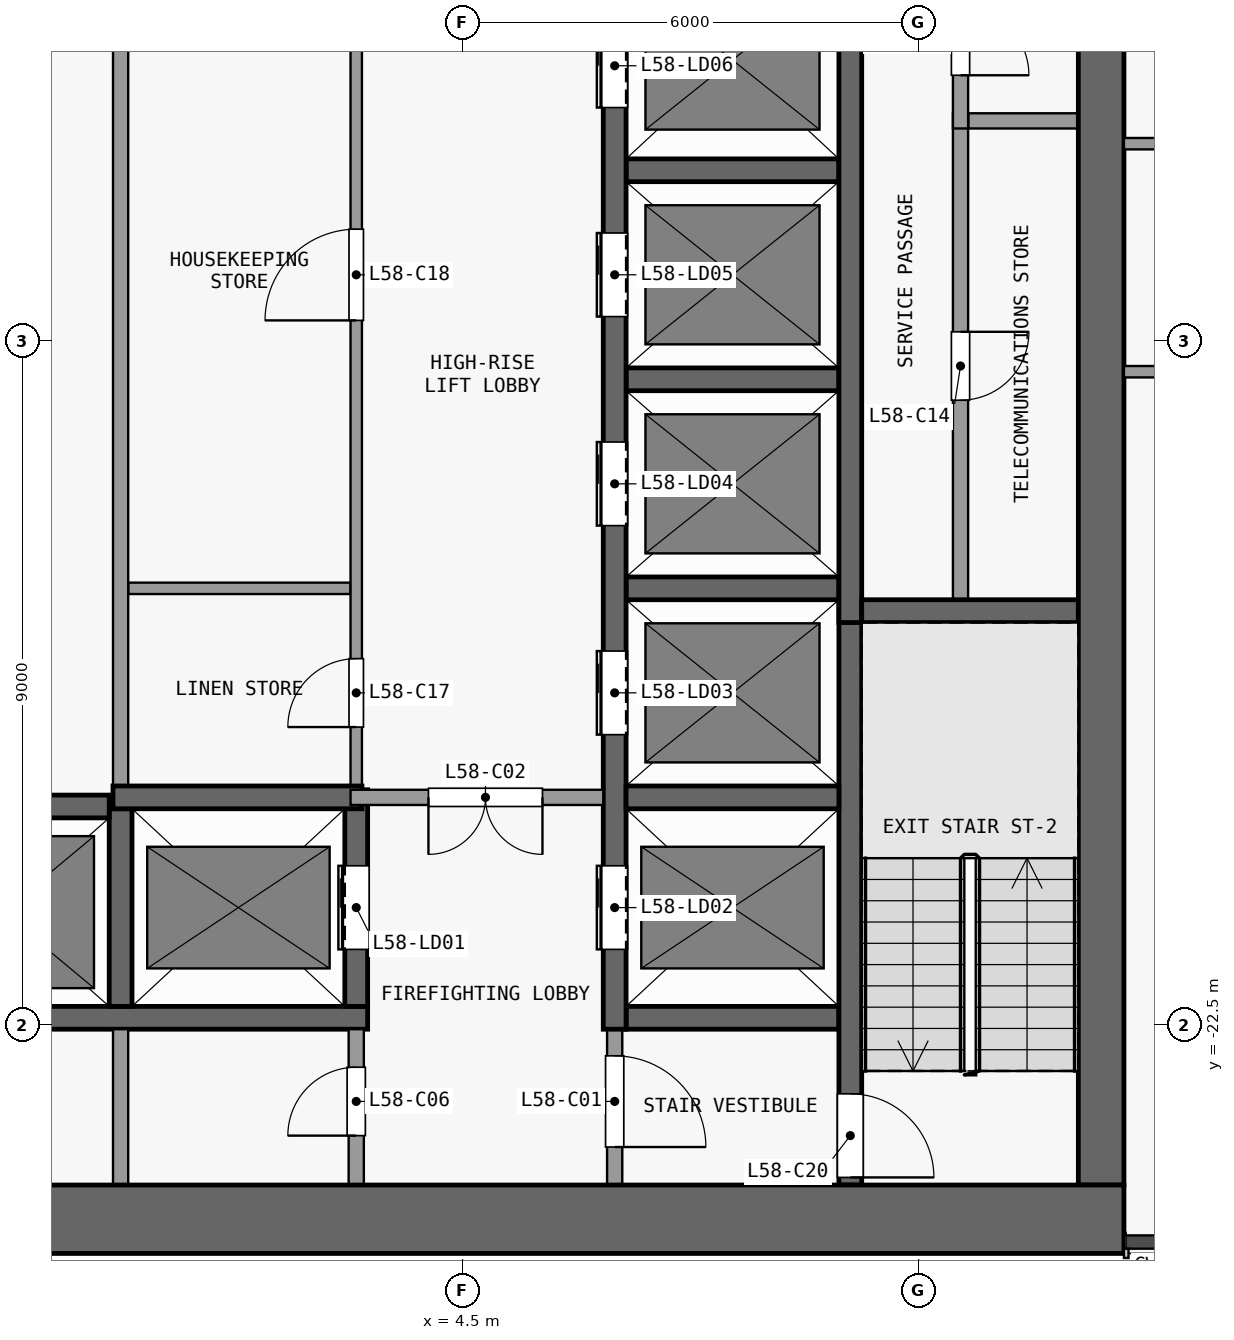
"""IFC4 building model, lengths in metres.
Left out: names, types, materials, properties, quantities, classifications, styles, units other than length and angle.
Written with IfcOpenShell. Run it as: python <this file> out.ifc"""

import sys

from ifc_helpers import new_model, si_unit, direction, frame, frame_2d, origin, place, context, subcontext, project, spatial, rectangle, extrude, element, fill, save


model = new_model("IFC4")
c1 = context("Model", 3, precision=1e-05, world=origin(), true_north=direction((0.0, 1.0)))
c2 = subcontext(c1, "Body", "Model", "MODEL_VIEW")
j1 = project(units=[si_unit("LENGTHUNIT", "METRE"), si_unit("PLANEANGLEUNIT", "RADIAN")], contexts=[c1])
p1 = place(None, origin())
s1 = spatial("IfcSite", under=j1, at=p1, CompositionType="ELEMENT")
p2 = place(p1, origin())
s2 = spatial("IfcBuilding", under=s1, at=p2, CompositionType="ELEMENT")
p3 = place(p2, frame((0.0, 0.0, 230.3)))
s3 = spatial("IfcBuildingStorey", under=s2, at=p3, CompositionType="ELEMENT", Elevation=230.3)
p4 = place(p3, frame((-13.2, -25.05, 0.0), z_axis=(0.0, 0.0, 1.0), x_axis=(1.0, 0.0, 0.0)))
e1 = element("IfcWall", 1, at=p4, inside=s3, PredefinedType="SHEAR", context=c2, shape_type="SweptSolid", body=[
    extrude(rectangle(XDim=26.4, YDim=0.9, at=frame_2d((13.2, 0.0))), origin(), (0.0, 0.0, 1.0), 3.3),
])
p5 = place(p3, frame((12.9, -24.6, 0.0), z_axis=(0.0, 0.0, 1.0), x_axis=(0.0, 1.0, 0.0)))
e2 = element("IfcWall", 2, at=p5, inside=s3, PredefinedType="SHEAR", context=c2, shape_type="SweptSolid", body=[
    extrude(rectangle(XDim=16.1, YDim=0.6, at=frame_2d((8.05, 0.0))), origin(), (0.0, 0.0, 1.0), 3.3),
])
p6 = place(p3, frame((-3.25, -22.4, 0.0), z_axis=(0.0, 0.0, 1.0), x_axis=(1.0, 0.0, 0.0)))
e3 = element("IfcWall", 3, at=p6, inside=s3, PredefinedType="SHEAR", context=c2, shape_type="SweptSolid", body=[
    extrude(rectangle(XDim=6.5, YDim=0.3, at=frame_2d((3.25, 0.0))), origin(), (0.0, 0.0, 1.0), 3.3),
])
p7 = place(p3, frame((6.65, -22.4, 0.0), z_axis=(0.0, 0.0, 1.0), x_axis=(1.0, 0.0, 0.0)))
e4 = element("IfcWall", 4, at=p7, inside=s3, PredefinedType="SHEAR", context=c2, shape_type="SweptSolid", body=[
    extrude(rectangle(XDim=2.8, YDim=0.3, at=frame_2d((1.4, 0.0))), origin(), (0.0, 0.0, 1.0), 3.3),
])
p8 = place(p3, frame((-3.2, -19.62, 0.0), z_axis=(0.0, 0.0, 1.0), x_axis=(1.0, 0.0, 0.0)))
e5 = element("IfcWall", 5, at=p8, inside=s3, PredefinedType="SHEAR", context=c2, shape_type="SweptSolid", body=[
    extrude(rectangle(XDim=3.05, YDim=0.3, at=frame_2d((1.525, 0.0))), origin(), (0.0, 0.0, 1.0), 3.3),
])
p9 = place(p3, frame((-0.1, -19.5, 0.0), z_axis=(0.0, 0.0, 1.0), x_axis=(1.0, 0.0, 0.0)))
e6 = element("IfcWall", 6, at=p9, inside=s3, PredefinedType="SHEAR", context=c2, shape_type="SweptSolid", body=[
    extrude(rectangle(XDim=3.275, YDim=0.3, at=frame_2d((1.638, 0.0))), origin(), (0.0, 0.0, 1.0), 3.3),
])
p10 = place(p3, frame((6.35, -19.5, 0.0), z_axis=(0.0, 0.0, 1.0), x_axis=(-1.0, 0.0, 0.0)))
e7 = element("IfcWall", 7, at=p10, inside=s3, PredefinedType="PARTITIONING", context=c2, shape_type="SweptSolid", body=[
    extrude(rectangle(XDim=3.325, YDim=0.2, at=frame_2d((1.663, 0.0))), origin(), (0.0, 0.0, 1.0), 3.3),
])
p11 = place(p10, frame((0.8, 0.0, 0.0)))
e8 = element("IfcOpeningElement", 8, at=p11, cuts=e7, PredefinedType="OPENING", context=c2, shape_type="SweptSolid", body=[
    extrude(rectangle(XDim=1.5, YDim=2.1, at=frame_2d((0.75, 1.05))), frame((0.0, 0.11, 0.0), z_axis=(0.0, -1.0, 0.0), x_axis=(1.0, 0.0, 0.0)), (0.0, 0.0, 1.0), 0.22),
])
p12 = place(p3, frame((6.65, -19.5, 0.0), z_axis=(0.0, 0.0, 1.0), x_axis=(1.0, 0.0, 0.0)))
e9 = element("IfcWall", 9, at=p12, inside=s3, PredefinedType="SHEAR", context=c2, shape_type="SweptSolid", body=[
    extrude(rectangle(XDim=2.8, YDim=0.3, at=frame_2d((1.4, 0.0))), origin(), (0.0, 0.0, 1.0), 3.3),
])
p13 = place(p3, frame((9.75, -17.05, 0.0), z_axis=(0.0, 0.0, 1.0), x_axis=(1.0, 0.0, 0.0)))
e10 = element("IfcWall", 10, at=p13, inside=s3, PredefinedType="SHEAR", context=c2, shape_type="SweptSolid", body=[
    extrude(rectangle(XDim=2.85, YDim=0.3, at=frame_2d((1.425, 0.0))), origin(), (0.0, 0.0, 1.0), 3.3),
])
p14 = place(p3, frame((0.1, -16.75, 0.0), z_axis=(0.0, 0.0, 1.0), x_axis=(1.0, 0.0, 0.0)))
e11 = element("IfcWall", 11, at=p14, inside=s3, PredefinedType="PARTITIONING", context=c2, shape_type="SweptSolid", body=[
    extrude(rectangle(XDim=2.925, YDim=0.15, at=frame_2d((1.462, 0.0))), origin(), (0.0, 0.0, 1.0), 3.3),
])
for number, where, z_axis, x_axis in (
    (12, (6.65, -16.75, 0.0), (0.0, 0.0, 1.0), (1.0, 0.0, 0.0)),
    (13, (6.65, -14.0, 0.0), (0.0, 0.0, 1.0), (1.0, 0.0, 0.0)),
    (14, (6.65, -11.25, 0.0), (0.0, 0.0, 1.0), (1.0, 0.0, 0.0)),
):
    element("IfcWall", number, at=place(p3, frame(where, z_axis=z_axis, x_axis=x_axis)), inside=s3, PredefinedType="SHEAR", context=c2, shape_type="SweptSolid", body=[
        extrude(rectangle(XDim=2.8, YDim=0.3, at=frame_2d((1.4, 0.0))), origin(), (0.0, 0.0, 1.0), 3.3),
    ])
p15 = place(p3, frame((11.15, -10.6, 0.0), z_axis=(0.0, 0.0, 1.0), x_axis=(1.0, 0.0, 0.0)))
e15 = element("IfcWall", 15, at=p15, inside=s3, PredefinedType="PARTITIONING", context=c2, shape_type="SweptSolid", body=[
    extrude(rectangle(XDim=1.45, YDim=0.2, at=frame_2d((0.725, 0.0))), origin(), (0.0, 0.0, 1.0), 3.3),
])
p16 = place(p3, frame((0.0, -24.6, 0.0), z_axis=(0.0, 0.0, 1.0), x_axis=(0.0, 1.0, 0.0)))
e16 = element("IfcWall", 16, at=p16, inside=s3, PredefinedType="PARTITIONING", context=c2, shape_type="SweptSolid", body=[
    extrude(rectangle(XDim=2.05, YDim=0.2, at=frame_2d((1.025, 0.0))), origin(), (0.0, 0.0, 1.0), 3.3),
])
p17 = place(p3, frame((0.0, -22.25, 0.0), z_axis=(0.0, 0.0, 1.0), x_axis=(0.0, 1.0, 0.0)))
e17 = element("IfcWall", 17, at=p17, inside=s3, PredefinedType="SHEAR", context=c2, shape_type="SweptSolid", body=[
    extrude(rectangle(XDim=2.6, YDim=0.3, at=frame_2d((1.3, 0.0))), origin(), (0.0, 0.0, 1.0), 3.3),
])
p18 = place(p3, frame((0.0, -19.35, 0.0), z_axis=(0.0, 0.0, 1.0), x_axis=(0.0, 1.0, 0.0)))
e18 = element("IfcWall", 18, at=p18, inside=s3, PredefinedType="PARTITIONING", context=c2, shape_type="SweptSolid", body=[
    extrude(rectangle(XDim=10.85, YDim=0.2, at=frame_2d((5.425, 0.0))), origin(), (0.0, 0.0, 1.0), 3.3),
])
p19 = place(p3, frame((3.1, -24.6, 0.0), z_axis=(0.0, 0.0, 1.0), x_axis=(0.0, 1.0, 0.0)))
e19 = element("IfcWall", 19, at=p19, inside=s3, PredefinedType="PARTITIONING", context=c2, shape_type="SweptSolid", body=[
    extrude(rectangle(XDim=2.05, YDim=0.2, at=frame_2d((1.025, 0.0))), origin(), (0.0, 0.0, 1.0), 3.3),
])
p20 = place(p19, frame((0.65, 0.0, 0.0)))
e20 = element("IfcOpeningElement", 20, at=p20, cuts=e19, PredefinedType="OPENING", context=c2, shape_type="SweptSolid", body=[
    extrude(rectangle(XDim=0.9, YDim=2.1, at=frame_2d((0.45, 1.05))), frame((0.0, 0.11, 0.0), z_axis=(0.0, -1.0, 0.0), x_axis=(1.0, 0.0, 0.0)), (0.0, 0.0, 1.0), 0.22),
])
p21 = place(p3, frame((3.1, -22.25, 0.0), z_axis=(0.0, 0.0, 1.0), x_axis=(0.0, 1.0, 0.0)))
e21 = element("IfcWall", 21, at=p21, inside=s3, PredefinedType="SHEAR", context=c2, shape_type="SweptSolid", body=[
    extrude(rectangle(XDim=2.85, YDim=0.3, at=frame_2d((1.425, 0.0))), origin(), (0.0, 0.0, 1.0), 3.3),
])
p22 = place(p21, frame((0.75, 0.0, 0.0)))
e22 = element("IfcOpeningElement", 22, at=p22, cuts=e21, PredefinedType="OPENING", context=c2, shape_type="SweptSolid", body=[
    extrude(rectangle(XDim=1.1, YDim=2.1, at=frame_2d((0.55, 1.05))), frame((0.0, 0.16, 0.0), z_axis=(0.0, -1.0, 0.0), x_axis=(1.0, 0.0, 0.0)), (0.0, 0.0, 1.0), 0.32),
])
p23 = place(p3, frame((3.1, -19.4, 0.0), z_axis=(0.0, 0.0, 1.0), x_axis=(0.0, 1.0, 0.0)))
e23 = element("IfcWall", 23, at=p23, inside=s3, PredefinedType="PARTITIONING", context=c2, shape_type="SweptSolid", body=[
    extrude(rectangle(XDim=10.9, YDim=0.15, at=frame_2d((5.45, 0.0))), origin(), (0.0, 0.0, 1.0), 3.3),
])
p24 = place(p23, frame((0.825, 0.0, 0.0)))
e24 = element("IfcOpeningElement", 24, at=p24, cuts=e23, PredefinedType="OPENING", context=c2, shape_type="SweptSolid", body=[
    extrude(rectangle(XDim=0.9, YDim=2.1, at=frame_2d((0.45, 1.05))), frame((0.0, 0.085, 0.0), z_axis=(0.0, -1.0, 0.0), x_axis=(1.0, 0.0, 0.0)), (0.0, 0.0, 1.0), 0.17),
])
p25 = place(p23, frame((6.175, 0.0, 0.0)))
e25 = element("IfcOpeningElement", 25, at=p25, cuts=e23, PredefinedType="OPENING", context=c2, shape_type="SweptSolid", body=[
    extrude(rectangle(XDim=1.2, YDim=2.1, at=frame_2d((0.6, 1.05))), frame((0.0, 0.085, 0.0), z_axis=(0.0, -1.0, 0.0), x_axis=(1.0, 0.0, 0.0)), (0.0, 0.0, 1.0), 0.17),
])
p26 = place(p3, frame((6.5, -22.55, 0.0), z_axis=(0.0, 0.0, 1.0), x_axis=(0.0, -1.0, 0.0)))
e26 = element("IfcWall", 26, at=p26, inside=s3, PredefinedType="PARTITIONING", context=c2, shape_type="SweptSolid", body=[
    extrude(rectangle(XDim=2.05, YDim=0.2, at=frame_2d((1.025, 0.0))), origin(), (0.0, 0.0, 1.0), 3.3),
])
p27 = place(p26, frame((0.35, 0.0, 0.0)))
e27 = element("IfcOpeningElement", 27, at=p27, cuts=e26, PredefinedType="OPENING", context=c2, shape_type="SweptSolid", body=[
    extrude(rectangle(XDim=1.2, YDim=2.1, at=frame_2d((0.6, 1.05))), frame((0.0, 0.11, 0.0), z_axis=(0.0, -1.0, 0.0), x_axis=(1.0, 0.0, 0.0)), (0.0, 0.0, 1.0), 0.22),
])
p28 = place(p3, frame((6.5, -22.55, 0.0), z_axis=(0.0, 0.0, 1.0), x_axis=(0.0, 1.0, 0.0)))
e28 = element("IfcWall", 28, at=p28, inside=s3, PredefinedType="SHEAR", context=c2, shape_type="SweptSolid", body=[
    extrude(rectangle(XDim=14.05, YDim=0.3, at=frame_2d((7.025, 0.0))), origin(), (0.0, 0.0, 1.0), 3.3),
])
p29 = place(p28, frame((1.05, 0.0, 0.0)))
e29 = element("IfcOpeningElement", 29, at=p29, cuts=e28, PredefinedType="OPENING", context=c2, shape_type="SweptSolid", body=[
    extrude(rectangle(XDim=1.1, YDim=2.1, at=frame_2d((0.55, 1.05))), frame((0.0, 0.16, 0.0), z_axis=(0.0, -1.0, 0.0), x_axis=(1.0, 0.0, 0.0)), (0.0, 0.0, 1.0), 0.32),
])
p30 = place(p28, frame((3.875, 0.0, 0.0)))
e30 = element("IfcOpeningElement", 30, at=p30, cuts=e28, PredefinedType="OPENING", context=c2, shape_type="SweptSolid", body=[
    extrude(rectangle(XDim=1.1, YDim=2.1, at=frame_2d((0.55, 1.05))), frame((0.0, 0.16, 0.0), z_axis=(0.0, -1.0, 0.0), x_axis=(1.0, 0.0, 0.0)), (0.0, 0.0, 1.0), 0.32),
])
p31 = place(p28, frame((6.625, 0.0, 0.0)))
e31 = element("IfcOpeningElement", 31, at=p31, cuts=e28, PredefinedType="OPENING", context=c2, shape_type="SweptSolid", body=[
    extrude(rectangle(XDim=1.1, YDim=2.1, at=frame_2d((0.55, 1.05))), frame((0.0, 0.16, 0.0), z_axis=(0.0, -1.0, 0.0), x_axis=(1.0, 0.0, 0.0)), (0.0, 0.0, 1.0), 0.32),
])
p32 = place(p28, frame((9.375, 0.0, 0.0)))
e32 = element("IfcOpeningElement", 32, at=p32, cuts=e28, PredefinedType="OPENING", context=c2, shape_type="SweptSolid", body=[
    extrude(rectangle(XDim=1.1, YDim=2.1, at=frame_2d((0.55, 1.05))), frame((0.0, 0.16, 0.0), z_axis=(0.0, -1.0, 0.0), x_axis=(1.0, 0.0, 0.0)), (0.0, 0.0, 1.0), 0.32),
])
p33 = place(p28, frame((12.125, 0.0, 0.0)))
e33 = element("IfcOpeningElement", 33, at=p33, cuts=e28, PredefinedType="OPENING", context=c2, shape_type="SweptSolid", body=[
    extrude(rectangle(XDim=1.1, YDim=2.1, at=frame_2d((0.55, 1.05))), frame((0.0, 0.16, 0.0), z_axis=(0.0, -1.0, 0.0), x_axis=(1.0, 0.0, 0.0)), (0.0, 0.0, 1.0), 0.32),
])
p34 = place(p3, frame((9.6, -16.9, 0.0), z_axis=(0.0, 0.0, 1.0), x_axis=(0.0, -1.0, 0.0)))
e34 = element("IfcWall", 34, at=p34, inside=s3, PredefinedType="SHEAR", context=c2, shape_type="SweptSolid", body=[
    extrude(rectangle(XDim=7.7, YDim=0.3, at=frame_2d((3.85, 0.0))), origin(), (0.0, 0.0, 1.0), 3.3),
])
p35 = place(p34, frame((6.5, 0.0, 0.0)))
e35 = element("IfcOpeningElement", 35, at=p35, cuts=e34, PredefinedType="OPENING", context=c2, shape_type="SweptSolid", body=[
    extrude(rectangle(XDim=1.1, YDim=2.1, at=frame_2d((0.55, 1.05))), frame((0.0, 0.16, 0.0), z_axis=(0.0, -1.0, 0.0), x_axis=(1.0, 0.0, 0.0)), (0.0, 0.0, 1.0), 0.32),
])
p36 = place(p3, frame((9.6, -17.2, 0.0), z_axis=(0.0, 0.0, 1.0), x_axis=(0.0, 1.0, 0.0)))
e36 = element("IfcWall", 36, at=p36, inside=s3, PredefinedType="SHEAR", context=c2, shape_type="SweptSolid", body=[
    extrude(rectangle(XDim=8.7, YDim=0.3, at=frame_2d((4.35, 0.0))), origin(), (0.0, 0.0, 1.0), 3.3),
])
p37 = place(p3, frame((11.05, -10.5, 0.0), z_axis=(0.0, 0.0, 1.0), x_axis=(0.0, -1.0, 0.0)))
e37 = element("IfcWall", 37, at=p37, inside=s3, PredefinedType="PARTITIONING", context=c2, shape_type="SweptSolid", body=[
    extrude(rectangle(XDim=6.4, YDim=0.2, at=frame_2d((3.2, 0.0))), origin(), (0.0, 0.0, 1.0), 3.3),
])
p38 = place(p37, frame((2.875, 0.0, 0.0)))
e38 = element("IfcOpeningElement", 38, at=p38, cuts=e37, PredefinedType="OPENING", context=c2, shape_type="SweptSolid", body=[
    extrude(rectangle(XDim=0.9, YDim=2.1, at=frame_2d((0.45, 1.05))), frame((0.0, 0.11, 0.0), z_axis=(0.0, -1.0, 0.0), x_axis=(1.0, 0.0, 0.0)), (0.0, 0.0, 1.0), 0.22),
])
p39 = place(p3, frame((11.05, -8.5, 0.0), z_axis=(0.0, 0.0, 1.0), x_axis=(0.0, -1.0, 0.0)))
e39 = element("IfcWall", 39, at=p39, inside=s3, PredefinedType="PARTITIONING", context=c2, shape_type="SweptSolid", body=[
    extrude(rectangle(XDim=2.2, YDim=0.2, at=frame_2d((1.1, 0.0))), origin(), (0.0, 0.0, 1.0), 3.3),
])
p40 = place(p39, frame((0.6, 0.0, 0.0)))
e40 = element("IfcOpeningElement", 40, at=p40, cuts=e39, PredefinedType="OPENING", context=c2, shape_type="SweptSolid", body=[
    extrude(rectangle(XDim=0.9, YDim=2.1, at=frame_2d((0.45, 1.05))), frame((0.0, 0.11, 0.0), z_axis=(0.0, -1.0, 0.0), x_axis=(1.0, 0.0, 0.0)), (0.0, 0.0, 1.0), 0.22),
])
p41 = place(p3, frame((13.2, -13.9, 0.0), z_axis=(0.0, 0.0, 1.0), x_axis=(1.0, 0.0, 0.0)))
e41 = element("IfcWall", 41, at=p41, inside=s3, PredefinedType="PARTITIONING", context=c2, shape_type="SweptSolid", body=[
    extrude(rectangle(XDim=6.062, YDim=0.15, at=frame_2d((3.031, 0.0))), origin(), (0.0, 0.0, 1.0), 3.3),
])
p42 = place(p41, frame((4.5, 0.0, 0.0)))
e42 = element("IfcOpeningElement", 42, at=p42, cuts=e41, PredefinedType="OPENING", context=c2, shape_type="SweptSolid", body=[
    extrude(rectangle(XDim=0.9, YDim=2.1, at=frame_2d((0.45, 1.05))), frame((0.0, 0.085, 0.0), z_axis=(0.0, -1.0, 0.0), x_axis=(1.0, 0.0, 0.0)), (0.0, 0.0, 1.0), 0.17),
])
p43 = place(p3, frame((13.2, -10.9, 0.0), z_axis=(0.0, 0.0, 1.0), x_axis=(1.0, 0.0, 0.0)))
e43 = element("IfcWall", 43, at=p43, inside=s3, PredefinedType="PARTITIONING", context=c2, shape_type="SweptSolid", body=[
    extrude(rectangle(XDim=6.062, YDim=0.15, at=frame_2d((3.031, 0.0))), origin(), (0.0, 0.0, 1.0), 3.3),
])
p44 = place(p43, frame((1.0, 0.0, 0.0)))
e44 = element("IfcOpeningElement", 44, at=p44, cuts=e43, PredefinedType="OPENING", context=c2, shape_type="SweptSolid", body=[
    extrude(rectangle(XDim=0.9, YDim=2.1, at=frame_2d((0.45, 1.05))), frame((0.0, 0.085, 0.0), z_axis=(0.0, -1.0, 0.0), x_axis=(1.0, 0.0, 0.0)), (0.0, 0.0, 1.0), 0.17),
])
p45 = place(p43, frame((4.1, 0.0, 0.0)))
e45 = element("IfcOpeningElement", 45, at=p45, cuts=e43, PredefinedType="OPENING", context=c2, shape_type="SweptSolid", body=[
    extrude(rectangle(XDim=0.9, YDim=2.1, at=frame_2d((0.45, 1.05))), frame((0.0, 0.085, 0.0), z_axis=(0.0, -1.0, 0.0), x_axis=(1.0, 0.0, 0.0)), (0.0, 0.0, 1.0), 0.17),
])
p46 = place(p22, origin())
e46 = element("IfcDoor", 46, at=p46, inside=s3, OperationType="DOUBLE_DOOR_SLIDING", PredefinedType="DOOR", context=c2, shape_type="SweptSolid", body=[
    extrude(rectangle(XDim=1.1, YDim=2.1, at=frame_2d((0.55, 1.05))), frame((0.0, 0.025, 0.0), z_axis=(0.0, -1.0, 0.0), x_axis=(1.0, 0.0, 0.0)), (0.0, 0.0, 1.0), 0.05),
])
fill(e22, e46)
p47 = place(p29, origin())
e47 = element("IfcDoor", 47, at=p47, inside=s3, OperationType="DOUBLE_DOOR_SLIDING", PredefinedType="DOOR", context=c2, shape_type="SweptSolid", body=[
    extrude(rectangle(XDim=1.1, YDim=2.1, at=frame_2d((0.55, 1.05))), frame((0.0, 0.025, 0.0), z_axis=(0.0, -1.0, 0.0), x_axis=(1.0, 0.0, 0.0)), (0.0, 0.0, 1.0), 0.05),
])
fill(e29, e47)
p48 = place(p30, origin())
e48 = element("IfcDoor", 48, at=p48, inside=s3, OperationType="DOUBLE_DOOR_SLIDING", PredefinedType="DOOR", context=c2, shape_type="SweptSolid", body=[
    extrude(rectangle(XDim=1.1, YDim=2.1, at=frame_2d((0.55, 1.05))), frame((0.0, 0.025, 0.0), z_axis=(0.0, -1.0, 0.0), x_axis=(1.0, 0.0, 0.0)), (0.0, 0.0, 1.0), 0.05),
])
fill(e30, e48)
p49 = place(p31, origin())
e49 = element("IfcDoor", 49, at=p49, inside=s3, OperationType="DOUBLE_DOOR_SLIDING", PredefinedType="DOOR", context=c2, shape_type="SweptSolid", body=[
    extrude(rectangle(XDim=1.1, YDim=2.1, at=frame_2d((0.55, 1.05))), frame((0.0, 0.025, 0.0), z_axis=(0.0, -1.0, 0.0), x_axis=(1.0, 0.0, 0.0)), (0.0, 0.0, 1.0), 0.05),
])
fill(e31, e49)
p50 = place(p32, origin())
e50 = element("IfcDoor", 50, at=p50, inside=s3, OperationType="DOUBLE_DOOR_SLIDING", PredefinedType="DOOR", context=c2, shape_type="SweptSolid", body=[
    extrude(rectangle(XDim=1.1, YDim=2.1, at=frame_2d((0.55, 1.05))), frame((0.0, 0.025, 0.0), z_axis=(0.0, -1.0, 0.0), x_axis=(1.0, 0.0, 0.0)), (0.0, 0.0, 1.0), 0.05),
])
fill(e32, e50)
p51 = place(p33, origin())
e51 = element("IfcDoor", 51, at=p51, inside=s3, OperationType="DOUBLE_DOOR_SLIDING", PredefinedType="DOOR", context=c2, shape_type="SweptSolid", body=[
    extrude(rectangle(XDim=1.1, YDim=2.1, at=frame_2d((0.55, 1.05))), frame((0.0, 0.025, 0.0), z_axis=(0.0, -1.0, 0.0), x_axis=(1.0, 0.0, 0.0)), (0.0, 0.0, 1.0), 0.05),
])
fill(e33, e51)
p52 = place(p27, origin())
e52 = element("IfcDoor", 52, at=p52, inside=s3, OperationType="SINGLE_SWING_RIGHT", PredefinedType="DOOR", context=c2, shape_type="SweptSolid", body=[
    extrude(rectangle(XDim=1.2, YDim=2.1, at=frame_2d((0.6, 1.05))), frame((0.0, 0.025, 0.0), z_axis=(0.0, -1.0, 0.0), x_axis=(1.0, 0.0, 0.0)), (0.0, 0.0, 1.0), 0.05),
])
fill(e27, e52)
p53 = place(p11, origin())
e53 = element("IfcDoor", 53, at=p53, inside=s3, OperationType="DOUBLE_DOOR_SINGLE_SWING", PredefinedType="DOOR", context=c2, shape_type="SweptSolid", body=[
    extrude(rectangle(XDim=1.5, YDim=2.1, at=frame_2d((0.75, 1.05))), frame((0.0, 0.025, 0.0), z_axis=(0.0, -1.0, 0.0), x_axis=(1.0, 0.0, 0.0)), (0.0, 0.0, 1.0), 0.05),
])
fill(e8, e53)
p54 = place(p20, origin())
e54 = element("IfcDoor", 54, at=p54, inside=s3, OperationType="SINGLE_SWING_LEFT", PredefinedType="DOOR", context=c2, shape_type="SweptSolid", body=[
    extrude(rectangle(XDim=0.9, YDim=2.1, at=frame_2d((0.45, 1.05))), frame((0.0, 0.025, 0.0), z_axis=(0.0, -1.0, 0.0), x_axis=(1.0, 0.0, 0.0)), (0.0, 0.0, 1.0), 0.05),
])
fill(e20, e54)
p55 = place(p40, origin())
e55 = element("IfcDoor", 55, at=p55, inside=s3, OperationType="SINGLE_SWING_RIGHT", PredefinedType="DOOR", context=c2, shape_type="SweptSolid", body=[
    extrude(rectangle(XDim=0.9, YDim=2.1, at=frame_2d((0.45, 1.05))), frame((0.0, 0.025, 0.0), z_axis=(0.0, -1.0, 0.0), x_axis=(1.0, 0.0, 0.0)), (0.0, 0.0, 1.0), 0.05),
])
fill(e40, e55)
p56 = place(p38, origin())
e56 = element("IfcDoor", 56, at=p56, inside=s3, OperationType="SINGLE_SWING_LEFT", PredefinedType="DOOR", context=c2, shape_type="SweptSolid", body=[
    extrude(rectangle(XDim=0.9, YDim=2.1, at=frame_2d((0.45, 1.05))), frame((0.0, 0.025, 0.0), z_axis=(0.0, -1.0, 0.0), x_axis=(1.0, 0.0, 0.0)), (0.0, 0.0, 1.0), 0.05),
])
fill(e38, e56)
p57 = place(p24, origin())
e57 = element("IfcDoor", 57, at=p57, inside=s3, OperationType="SINGLE_SWING_LEFT", PredefinedType="DOOR", context=c2, shape_type="SweptSolid", body=[
    extrude(rectangle(XDim=0.9, YDim=2.1, at=frame_2d((0.45, 1.05))), frame((0.0, 0.025, 0.0), z_axis=(0.0, -1.0, 0.0), x_axis=(1.0, 0.0, 0.0)), (0.0, 0.0, 1.0), 0.05),
])
fill(e24, e57)
p58 = place(p25, origin())
e58 = element("IfcDoor", 58, at=p58, inside=s3, OperationType="SINGLE_SWING_LEFT", PredefinedType="DOOR", context=c2, shape_type="SweptSolid", body=[
    extrude(rectangle(XDim=1.2, YDim=2.1, at=frame_2d((0.6, 1.05))), frame((0.0, 0.025, 0.0), z_axis=(0.0, -1.0, 0.0), x_axis=(1.0, 0.0, 0.0)), (0.0, 0.0, 1.0), 0.05),
])
fill(e25, e58)
p59 = place(p35, origin())
e59 = element("IfcDoor", 59, at=p59, inside=s3, OperationType="SINGLE_SWING_RIGHT", PredefinedType="DOOR", context=c2, shape_type="SweptSolid", body=[
    extrude(rectangle(XDim=1.1, YDim=2.1, at=frame_2d((0.55, 1.05))), frame((0.0, 0.025, 0.0), z_axis=(0.0, -1.0, 0.0), x_axis=(1.0, 0.0, 0.0)), (0.0, 0.0, 1.0), 0.05),
])
fill(e35, e59)
save(model, sys.argv[1])
